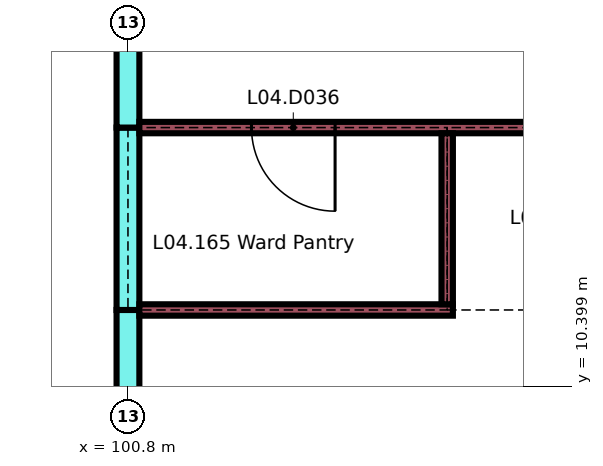
"""IFC4 building model, lengths in metres.
Left out: names, types, materials, properties, quantities, classifications, styles, units other than length and angle.
Written with IfcOpenShell. Run it as: python <this file> out.ifc"""

import sys

from ifc_helpers import new_model, si_unit, direction, frame, frame_2d, origin, place, context, subcontext, project, spatial, rectangle, extrude, element, fill, save


model = new_model("IFC4")
c1 = context("Model", 3, precision=1e-05, world=origin(), true_north=direction((0.0, 1.0)))
c2 = subcontext(c1, "Body", "Model", "MODEL_VIEW")
j1 = project(units=[si_unit("LENGTHUNIT", "METRE"), si_unit("PLANEANGLEUNIT", "RADIAN")], contexts=[c1])
p1 = place(None, origin())
s1 = spatial("IfcSite", under=j1, at=p1, CompositionType="ELEMENT")
p2 = place(p1, origin())
s2 = spatial("IfcBuilding", under=s1, at=p2, CompositionType="ELEMENT")
p3 = place(p2, frame((0.0, 0.0, 18.9)))
s3 = spatial("IfcBuildingStorey", under=s2, at=p3, CompositionType="ELEMENT", Elevation=18.9)
p4 = place(p3, frame((100.8, 8.4, 0.0), z_axis=(0.0, 0.0, 1.0), x_axis=(0.0, 1.0, 0.0)))
e1 = element("IfcWall", 1, at=p4, inside=s3, PredefinedType="SOLIDWALL", context=c2, shape_type="SweptSolid", body=[
    extrude(rectangle(XDim=3.0, YDim=0.3, at=frame_2d((1.5, 0.0))), origin(), (0.0, 0.0, 1.0), 3.26),
])
p5 = place(p3, frame((100.8, 11.4, 0.0), z_axis=(0.0, 0.0, 1.0), x_axis=(0.0, 1.0, 0.0)))
e2 = element("IfcWall", 2, at=p5, inside=s3, PredefinedType="SOLIDWALL", context=c2, shape_type="SweptSolid", body=[
    extrude(rectangle(XDim=2.4, YDim=0.3, at=frame_2d((1.2, 0.0))), origin(), (0.0, 0.0, 1.0), 3.26),
])
p6 = place(p3, frame((100.8, 13.8, 0.0), z_axis=(0.0, 0.0, 1.0), x_axis=(0.0, 1.0, 0.0)))
e3 = element("IfcWall", 3, at=p6, inside=s3, PredefinedType="SOLIDWALL", context=c2, shape_type="SweptSolid", body=[
    extrude(rectangle(XDim=2.625, YDim=0.3, at=frame_2d((1.312, 0.0))), origin(), (0.0, 0.0, 1.0), 3.26),
])
p7 = place(p3, frame((100.95, 11.4, 0.0), z_axis=(0.0, 0.0, 1.0), x_axis=(1.0, 0.0, 0.0)))
e4 = element("IfcWall", 4, at=p7, inside=s3, PredefinedType="PARTITIONING", context=c2, shape_type="SweptSolid", body=[
    extrude(rectangle(XDim=4.125, YDim=0.15, at=frame_2d((2.062, 0.0))), origin(), (0.0, 0.0, 1.0), 3.26),
])
p8 = place(p3, frame((100.95, 13.8, 0.0), z_axis=(0.0, 0.0, 1.0), x_axis=(1.0, 0.0, 0.0)))
e5 = element("IfcWall", 5, at=p8, inside=s3, PredefinedType="PARTITIONING", context=c2, shape_type="SweptSolid", body=[
    extrude(rectangle(XDim=8.325, YDim=0.15, at=frame_2d((4.163, 0.0))), origin(), (0.0, 0.0, 1.0), 3.26),
])
p9 = place(p8, frame((1.475, 0.0, 0.0)))
e6 = element("IfcOpeningElement", 6, at=p9, cuts=e5, PredefinedType="OPENING", context=c2, shape_type="SweptSolid", body=[
    extrude(rectangle(XDim=1.1, YDim=2.1, at=frame_2d((0.55, 1.05))), frame((0.0, 0.085, 0.0), z_axis=(0.0, -1.0, 0.0), x_axis=(1.0, 0.0, 0.0)), (0.0, 0.0, 1.0), 0.17),
])
p10 = place(p3, frame((105.0, 11.475, 0.0), z_axis=(0.0, 0.0, 1.0), x_axis=(0.0, 1.0, 0.0)))
e7 = element("IfcWall", 7, at=p10, inside=s3, PredefinedType="PARTITIONING", context=c2, shape_type="SweptSolid", body=[
    extrude(rectangle(XDim=2.25, YDim=0.15, at=frame_2d((1.125, 0.0))), origin(), (0.0, 0.0, 1.0), 3.26),
])
p11 = place(p9, origin())
e8 = element("IfcDoor", 8, at=p11, inside=s3, OperationType="SINGLE_SWING_RIGHT", PredefinedType="DOOR", context=c2, shape_type="SweptSolid", body=[
    extrude(rectangle(XDim=1.1, YDim=2.1, at=frame_2d((0.55, 1.05))), frame((0.0, 0.025, 0.0), z_axis=(0.0, -1.0, 0.0), x_axis=(1.0, 0.0, 0.0)), (0.0, 0.0, 1.0), 0.05),
])
fill(e6, e8)
save(model, sys.argv[1])
